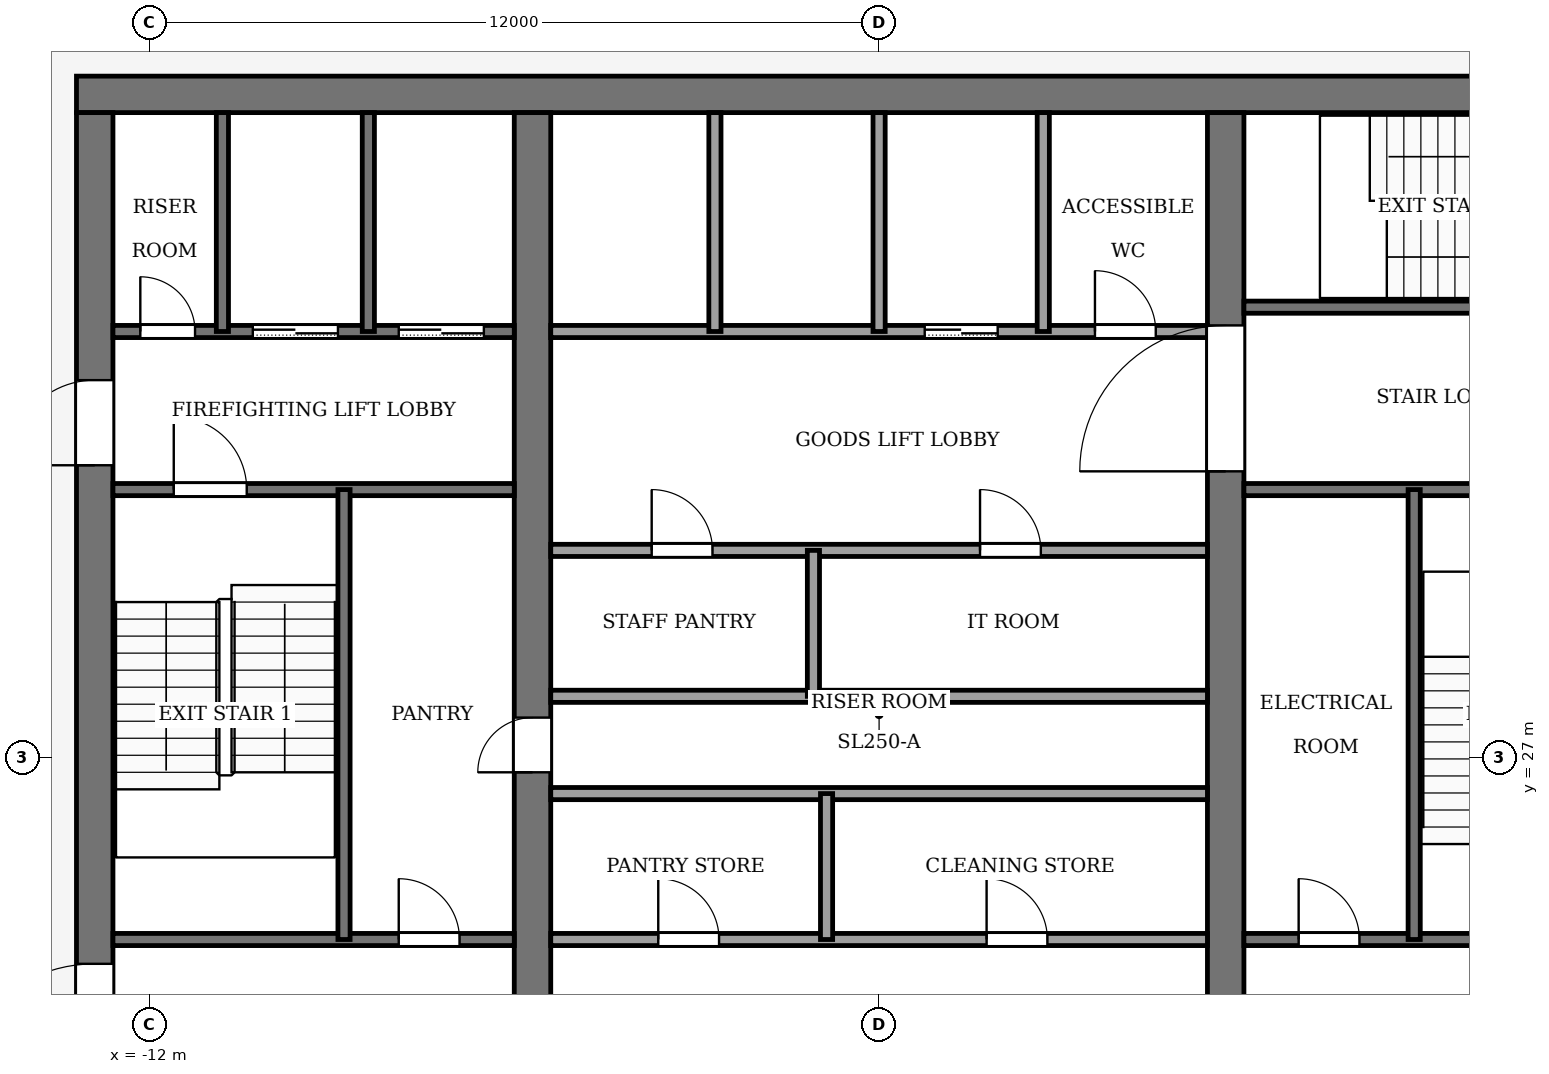
"""IFC4 building model, lengths in metres.
Left out: names, types, materials, properties, quantities, classifications, styles, units other than length and angle.
Written with IfcOpenShell. Run it as: python <this file> out.ifc"""

import sys

from ifc_helpers import new_model, si_unit, direction, frame, frame_2d, origin, place, context, subcontext, project, spatial, rectangle, extrude, element, fill, save


model = new_model("IFC4")
c1 = context("Model", 3, precision=1e-05, world=origin(), true_north=direction((0.0, 1.0)))
c2 = subcontext(c1, "Body", "Model", "MODEL_VIEW")
j1 = project(units=[si_unit("LENGTHUNIT", "METRE"), si_unit("PLANEANGLEUNIT", "RADIAN")], contexts=[c1])
p1 = place(None, origin())
s1 = spatial("IfcSite", under=j1, at=p1, CompositionType="ELEMENT")
p2 = place(p1, origin())
s2 = spatial("IfcBuilding", under=s1, at=p2, CompositionType="ELEMENT")
p3 = place(p2, frame((0.0, 0.0, 310.0)))
s3 = spatial("IfcBuildingStorey", under=s2, at=p3, CompositionType="ELEMENT", Elevation=310.0)
p4 = place(p3, frame((-13.2, 37.9, -0.13), z_axis=(0.0, 0.0, 1.0), x_axis=(1.0, 0.0, 0.0)))
e1 = element("IfcWall", 1, at=p4, inside=s3, PredefinedType="SHEAR", context=c2, shape_type="SweptSolid", body=[
    extrude(rectangle(XDim=26.4, YDim=0.6, at=frame_2d((13.2, 0.0))), origin(), (0.0, 0.0, 1.0), 4.0),
])
p5 = place(p3, frame((-12.9, 18.4, -0.13), z_axis=(0.0, 0.0, 1.0), x_axis=(0.0, 1.0, 0.0)))
e2 = element("IfcWall", 2, at=p5, inside=s3, PredefinedType="SHEAR", context=c2, shape_type="SweptSolid", body=[
    extrude(rectangle(XDim=19.2, YDim=0.6, at=frame_2d((9.6, 0.0))), origin(), (0.0, 0.0, 1.0), 4.0),
])
p6 = place(p5, frame((2.8, 0.0, 0.13)))
e3 = element("IfcOpeningElement", 3, at=p6, cuts=e2, PredefinedType="OPENING", context=c2, shape_type="SweptSolid", body=[
    extrude(rectangle(XDim=2.4, YDim=2.4, at=frame_2d((1.2, 1.2))), frame((0.0, 0.31, 0.0), z_axis=(0.0, -1.0, 0.0), x_axis=(1.0, 0.0, 0.0)), (0.0, 0.0, 1.0), 0.62),
])
p7 = place(p5, frame((13.4, 0.0, 0.13)))
e4 = element("IfcOpeningElement", 4, at=p7, cuts=e2, PredefinedType="OPENING", context=c2, shape_type="SweptSolid", body=[
    extrude(rectangle(XDim=1.4, YDim=2.2, at=frame_2d((0.7, 1.1))), frame((0.0, 0.31, 0.0), z_axis=(0.0, -1.0, 0.0), x_axis=(1.0, 0.0, 0.0)), (0.0, 0.0, 1.0), 0.62),
])
p8 = place(p3, frame((-5.7, 18.4, -0.13), z_axis=(0.0, 0.0, 1.0), x_axis=(0.0, 1.0, 0.0)))
e5 = element("IfcWall", 5, at=p8, inside=s3, PredefinedType="SHEAR", context=c2, shape_type="SweptSolid", body=[
    extrude(rectangle(XDim=19.2, YDim=0.6, at=frame_2d((9.6, 0.0))), origin(), (0.0, 0.0, 1.0), 4.0),
])
p9 = place(p8, frame((8.35, 0.0, 0.13)))
e6 = element("IfcOpeningElement", 6, at=p9, cuts=e5, PredefinedType="OPENING", context=c2, shape_type="SweptSolid", body=[
    extrude(rectangle(XDim=0.9, YDim=2.1, at=frame_2d((0.45, 1.05))), frame((0.0, 0.31, 0.0), z_axis=(0.0, -1.0, 0.0), x_axis=(1.0, 0.0, 0.0)), (0.0, 0.0, 1.0), 0.62),
])
p10 = place(p3, frame((5.7, 18.4, -0.13), z_axis=(0.0, 0.0, 1.0), x_axis=(0.0, 1.0, 0.0)))
e7 = element("IfcWall", 7, at=p10, inside=s3, PredefinedType="SHEAR", context=c2, shape_type="SweptSolid", body=[
    extrude(rectangle(XDim=19.2, YDim=0.6, at=frame_2d((9.6, 0.0))), origin(), (0.0, 0.0, 1.0), 4.0),
])
p11 = place(p10, frame((13.3, 0.0, 0.13)))
e8 = element("IfcOpeningElement", 8, at=p11, cuts=e7, PredefinedType="OPENING", context=c2, shape_type="SweptSolid", body=[
    extrude(rectangle(XDim=2.4, YDim=2.4, at=frame_2d((1.2, 1.2))), frame((0.0, 0.31, 0.0), z_axis=(0.0, -1.0, 0.0), x_axis=(1.0, 0.0, 0.0)), (0.0, 0.0, 1.0), 0.62),
])
p12 = place(p3, frame((-12.6, 24.0, 0.0), z_axis=(0.0, 0.0, 1.0), x_axis=(1.0, 0.0, 0.0)))
e9 = element("IfcWall", 9, at=p12, inside=s3, PredefinedType="PARTITIONING", context=c2, shape_type="SweptSolid", body=[
    extrude(rectangle(XDim=6.6, YDim=0.2, at=frame_2d((3.3, 0.0))), origin(), (0.0, 0.0, 1.0), 3.87),
])
p13 = place(p12, frame((4.7, 0.0, 0.0)))
e10 = element("IfcOpeningElement", 10, at=p13, cuts=e9, PredefinedType="OPENING", context=c2, shape_type="SweptSolid", body=[
    extrude(rectangle(XDim=1.0, YDim=2.1, at=frame_2d((0.5, 1.05))), frame((0.0, 0.11, 0.0), z_axis=(0.0, -1.0, 0.0), x_axis=(1.0, 0.0, 0.0)), (0.0, 0.0, 1.0), 0.22),
])
p14 = place(p3, frame((-5.4, 24.0, 0.0), z_axis=(0.0, 0.0, 1.0), x_axis=(1.0, 0.0, 0.0)))
e11 = element("IfcWall", 11, at=p14, inside=s3, PredefinedType="PARTITIONING", context=c2, shape_type="SweptSolid", body=[
    extrude(rectangle(XDim=10.8, YDim=0.2, at=frame_2d((5.4, 0.0))), origin(), (0.0, 0.0, 1.0), 3.87),
])
p15 = place(p14, frame((1.768, 0.0, 0.0)))
e12 = element("IfcOpeningElement", 12, at=p15, cuts=e11, PredefinedType="OPENING", context=c2, shape_type="SweptSolid", body=[
    extrude(rectangle(XDim=1.0, YDim=2.1, at=frame_2d((0.5, 1.05))), frame((0.0, 0.11, 0.0), z_axis=(0.0, -1.0, 0.0), x_axis=(1.0, 0.0, 0.0)), (0.0, 0.0, 1.0), 0.22),
])
p16 = place(p14, frame((7.168, 0.0, 0.0)))
e13 = element("IfcOpeningElement", 13, at=p16, cuts=e11, PredefinedType="OPENING", context=c2, shape_type="SweptSolid", body=[
    extrude(rectangle(XDim=1.0, YDim=2.1, at=frame_2d((0.5, 1.05))), frame((0.0, 0.11, 0.0), z_axis=(0.0, -1.0, 0.0), x_axis=(1.0, 0.0, 0.0)), (0.0, 0.0, 1.0), 0.22),
])
p17 = place(p3, frame((6.0, 24.0, 0.0), z_axis=(0.0, 0.0, 1.0), x_axis=(1.0, 0.0, 0.0)))
e14 = element("IfcWall", 14, at=p17, inside=s3, PredefinedType="PARTITIONING", context=c2, shape_type="SweptSolid", body=[
    extrude(rectangle(XDim=6.6, YDim=0.2, at=frame_2d((3.3, 0.0))), origin(), (0.0, 0.0, 1.0), 3.87),
])
p18 = place(p17, frame((0.9, 0.0, 0.0)))
e15 = element("IfcOpeningElement", 15, at=p18, cuts=e14, PredefinedType="OPENING", context=c2, shape_type="SweptSolid", body=[
    extrude(rectangle(XDim=1.0, YDim=2.1, at=frame_2d((0.5, 1.05))), frame((0.0, 0.11, 0.0), z_axis=(0.0, -1.0, 0.0), x_axis=(1.0, 0.0, 0.0)), (0.0, 0.0, 1.0), 0.22),
])
p19 = place(p17, frame((4.4, 0.0, 0.0)))
e16 = element("IfcOpeningElement", 16, at=p19, cuts=e14, PredefinedType="OPENING", context=c2, shape_type="SweptSolid", body=[
    extrude(rectangle(XDim=1.2, YDim=2.2, at=frame_2d((0.6, 1.1))), frame((0.0, 0.11, 0.0), z_axis=(0.0, -1.0, 0.0), x_axis=(1.0, 0.0, 0.0)), (0.0, 0.0, 1.0), 0.22),
])
for number, where, z_axis, x_axis in (
    (17, (-5.4, 26.4, 0.0), (0.0, 0.0, 1.0), (1.0, 0.0, 0.0)),
    (18, (-5.4, 28.0, 0.0), (0.0, 0.0, 1.0), (1.0, 0.0, 0.0)),
):
    element("IfcWall", number, at=place(p3, frame(where, z_axis=z_axis, x_axis=x_axis)), inside=s3, PredefinedType="PARTITIONING", context=c2, shape_type="SweptSolid", body=[
        extrude(rectangle(XDim=10.8, YDim=0.2, at=frame_2d((5.4, 0.0))), origin(), (0.0, 0.0, 1.0), 3.87),
    ])
p20 = place(p3, frame((-5.4, 30.4, 0.0), z_axis=(0.0, 0.0, 1.0), x_axis=(1.0, 0.0, 0.0)))
e19 = element("IfcWall", 19, at=p20, inside=s3, PredefinedType="PARTITIONING", context=c2, shape_type="SweptSolid", body=[
    extrude(rectangle(XDim=10.8, YDim=0.2, at=frame_2d((5.4, 0.0))), origin(), (0.0, 0.0, 1.0), 3.87),
])
p21 = place(p20, frame((1.66, 0.0, 0.0)))
e20 = element("IfcOpeningElement", 20, at=p21, cuts=e19, PredefinedType="OPENING", context=c2, shape_type="SweptSolid", body=[
    extrude(rectangle(XDim=1.0, YDim=2.1, at=frame_2d((0.5, 1.05))), frame((0.0, 0.11, 0.0), z_axis=(0.0, -1.0, 0.0), x_axis=(1.0, 0.0, 0.0)), (0.0, 0.0, 1.0), 0.22),
])
p22 = place(p20, frame((7.06, 0.0, 0.0)))
e21 = element("IfcOpeningElement", 21, at=p22, cuts=e19, PredefinedType="OPENING", context=c2, shape_type="SweptSolid", body=[
    extrude(rectangle(XDim=1.0, YDim=2.1, at=frame_2d((0.5, 1.05))), frame((0.0, 0.11, 0.0), z_axis=(0.0, -1.0, 0.0), x_axis=(1.0, 0.0, 0.0)), (0.0, 0.0, 1.0), 0.22),
])
p23 = place(p3, frame((-12.6, 31.4, 0.0), z_axis=(0.0, 0.0, 1.0), x_axis=(1.0, 0.0, 0.0)))
e22 = element("IfcWall", 22, at=p23, inside=s3, PredefinedType="PARTITIONING", context=c2, shape_type="SweptSolid", body=[
    extrude(rectangle(XDim=6.6, YDim=0.2, at=frame_2d((3.3, 0.0))), origin(), (0.0, 0.0, 1.0), 3.87),
])
p24 = place(p23, frame((1.0, 0.0, 0.0)))
e23 = element("IfcOpeningElement", 23, at=p24, cuts=e22, PredefinedType="OPENING", context=c2, shape_type="SweptSolid", body=[
    extrude(rectangle(XDim=1.2, YDim=2.2, at=frame_2d((0.6, 1.1))), frame((0.0, 0.11, 0.0), z_axis=(0.0, -1.0, 0.0), x_axis=(1.0, 0.0, 0.0)), (0.0, 0.0, 1.0), 0.22),
])
p25 = place(p3, frame((6.0, 31.4, 0.0), z_axis=(0.0, 0.0, 1.0), x_axis=(1.0, 0.0, 0.0)))
e24 = element("IfcWall", 24, at=p25, inside=s3, PredefinedType="PARTITIONING", context=c2, shape_type="SweptSolid", body=[
    extrude(rectangle(XDim=6.6, YDim=0.2, at=frame_2d((3.3, 0.0))), origin(), (0.0, 0.0, 1.0), 3.87),
])
p26 = place(p3, frame((-12.6, 34.0, 0.0), z_axis=(0.0, 0.0, 1.0), x_axis=(1.0, 0.0, 0.0)))
e25 = element("IfcWall", 25, at=p26, inside=s3, PredefinedType="PARTITIONING", context=c2, shape_type="SweptSolid", body=[
    extrude(rectangle(XDim=6.6, YDim=0.2, at=frame_2d((3.3, 0.0))), origin(), (0.0, 0.0, 1.0), 3.87),
])
p27 = place(p26, frame((4.7, 0.0, 0.0)))
e26 = element("IfcOpeningElement", 26, at=p27, cuts=e25, PredefinedType="OPENING", context=c2, shape_type="SweptSolid", body=[
    extrude(rectangle(XDim=1.4, YDim=2.2, at=frame_2d((0.7, 1.1))), frame((0.0, 0.11, 0.0), z_axis=(0.0, -1.0, 0.0), x_axis=(1.0, 0.0, 0.0)), (0.0, 0.0, 1.0), 0.22),
])
p28 = place(p26, frame((2.3, 0.0, 0.0)))
e27 = element("IfcOpeningElement", 27, at=p28, cuts=e25, PredefinedType="OPENING", context=c2, shape_type="SweptSolid", body=[
    extrude(rectangle(XDim=1.4, YDim=2.2, at=frame_2d((0.7, 1.1))), frame((0.0, 0.11, 0.0), z_axis=(0.0, -1.0, 0.0), x_axis=(1.0, 0.0, 0.0)), (0.0, 0.0, 1.0), 0.22),
])
p29 = place(p26, frame((0.45, 0.0, 0.0)))
e28 = element("IfcOpeningElement", 28, at=p29, cuts=e25, PredefinedType="OPENING", context=c2, shape_type="SweptSolid", body=[
    extrude(rectangle(XDim=0.9, YDim=2.1, at=frame_2d((0.45, 1.05))), frame((0.0, 0.11, 0.0), z_axis=(0.0, -1.0, 0.0), x_axis=(1.0, 0.0, 0.0)), (0.0, 0.0, 1.0), 0.22),
])
p30 = place(p3, frame((-5.4, 34.0, 0.0), z_axis=(0.0, 0.0, 1.0), x_axis=(1.0, 0.0, 0.0)))
e29 = element("IfcWall", 29, at=p30, inside=s3, PredefinedType="PARTITIONING", context=c2, shape_type="SweptSolid", body=[
    extrude(rectangle(XDim=10.8, YDim=0.2, at=frame_2d((5.4, 0.0))), origin(), (0.0, 0.0, 1.0), 3.87),
])
p31 = place(p30, frame((6.15, 0.0, 0.0)))
e30 = element("IfcOpeningElement", 30, at=p31, cuts=e29, PredefinedType="OPENING", context=c2, shape_type="SweptSolid", body=[
    extrude(rectangle(XDim=1.2, YDim=2.2, at=frame_2d((0.6, 1.1))), frame((0.0, 0.11, 0.0), z_axis=(0.0, -1.0, 0.0), x_axis=(1.0, 0.0, 0.0)), (0.0, 0.0, 1.0), 0.22),
])
p32 = place(p30, frame((8.95, 0.0, 0.0)))
e31 = element("IfcOpeningElement", 31, at=p32, cuts=e29, PredefinedType="OPENING", context=c2, shape_type="SweptSolid", body=[
    extrude(rectangle(XDim=1.0, YDim=2.1, at=frame_2d((0.5, 1.05))), frame((0.0, 0.11, 0.0), z_axis=(0.0, -1.0, 0.0), x_axis=(1.0, 0.0, 0.0)), (0.0, 0.0, 1.0), 0.22),
])
p33 = place(p3, frame((6.0, 34.4, 0.0), z_axis=(0.0, 0.0, 1.0), x_axis=(1.0, 0.0, 0.0)))
e32 = element("IfcWall", 32, at=p33, inside=s3, PredefinedType="PARTITIONING", context=c2, shape_type="SweptSolid", body=[
    extrude(rectangle(XDim=6.6, YDim=0.2, at=frame_2d((3.3, 0.0))), origin(), (0.0, 0.0, 1.0), 3.87),
])
p34 = place(p33, frame((4.8, 0.0, 0.0)))
e33 = element("IfcOpeningElement", 33, at=p34, cuts=e32, PredefinedType="OPENING", context=c2, shape_type="SweptSolid", body=[
    extrude(rectangle(XDim=1.2, YDim=2.2, at=frame_2d((0.6, 1.1))), frame((0.0, 0.11, 0.0), z_axis=(0.0, -1.0, 0.0), x_axis=(1.0, 0.0, 0.0)), (0.0, 0.0, 1.0), 0.22),
])
p35 = place(p3, frame((-10.8, 34.0, 0.0), z_axis=(0.0, 0.0, 1.0), x_axis=(0.0, 1.0, 0.0)))
e34 = element("IfcWall", 34, at=p35, inside=s3, PredefinedType="PARTITIONING", context=c2, shape_type="SweptSolid", body=[
    extrude(rectangle(XDim=3.6, YDim=0.2, at=frame_2d((1.8, 0.0))), origin(), (0.0, 0.0, 1.0), 3.87),
])
p36 = place(p3, frame((-8.8, 24.0, 0.0), z_axis=(0.0, 0.0, 1.0), x_axis=(0.0, 1.0, 0.0)))
e35 = element("IfcWall", 35, at=p36, inside=s3, PredefinedType="PARTITIONING", context=c2, shape_type="SweptSolid", body=[
    extrude(rectangle(XDim=7.4, YDim=0.2, at=frame_2d((3.7, 0.0))), origin(), (0.0, 0.0, 1.0), 3.87),
])
for number, where, z_axis, x_axis in (
    (36, (-8.4, 34.0, 0.0), (0.0, 0.0, 1.0), (0.0, 1.0, 0.0)),
    (37, (-2.7, 34.0, 0.0), (0.0, 0.0, 1.0), (0.0, 1.0, 0.0)),
):
    element("IfcWall", number, at=place(p3, frame(where, z_axis=z_axis, x_axis=x_axis)), inside=s3, PredefinedType="PARTITIONING", context=c2, shape_type="SweptSolid", body=[
        extrude(rectangle(XDim=3.6, YDim=0.2, at=frame_2d((1.8, 0.0))), origin(), (0.0, 0.0, 1.0), 3.87),
    ])
for number, where, z_axis, x_axis in (
    (38, (-1.08, 28.0, 0.0), (0.0, 0.0, 1.0), (0.0, 1.0, 0.0)),
    (39, (-0.864, 24.0, 0.0), (0.0, 0.0, 1.0), (0.0, 1.0, 0.0)),
):
    element("IfcWall", number, at=place(p3, frame(where, z_axis=z_axis, x_axis=x_axis)), inside=s3, PredefinedType="PARTITIONING", context=c2, shape_type="SweptSolid", body=[
        extrude(rectangle(XDim=2.4, YDim=0.2, at=frame_2d((1.2, 0.0))), origin(), (0.0, 0.0, 1.0), 3.87),
    ])
for number, where, z_axis, x_axis in (
    (40, (0.0, 34.0, 0.0), (0.0, 0.0, 1.0), (0.0, 1.0, 0.0)),
    (41, (2.7, 34.0, 0.0), (0.0, 0.0, 1.0), (0.0, 1.0, 0.0)),
):
    element("IfcWall", number, at=place(p3, frame(where, z_axis=z_axis, x_axis=x_axis)), inside=s3, PredefinedType="PARTITIONING", context=c2, shape_type="SweptSolid", body=[
        extrude(rectangle(XDim=3.6, YDim=0.2, at=frame_2d((1.8, 0.0))), origin(), (0.0, 0.0, 1.0), 3.87),
    ])
p37 = place(p3, frame((8.8, 24.0, 0.0), z_axis=(0.0, 0.0, 1.0), x_axis=(0.0, 1.0, 0.0)))
e42 = element("IfcWall", 42, at=p37, inside=s3, PredefinedType="PARTITIONING", context=c2, shape_type="SweptSolid", body=[
    extrude(rectangle(XDim=7.4, YDim=0.2, at=frame_2d((3.7, 0.0))), origin(), (0.0, 0.0, 1.0), 3.87),
])
p38 = place(p31, origin())
e43 = element("IfcDoor", 43, at=p38, inside=s3, OperationType="SLIDING_TO_LEFT", PredefinedType="DOOR", context=c2, shape_type="SweptSolid", body=[
    extrude(rectangle(XDim=1.2, YDim=2.2, at=frame_2d((0.6, 1.1))), frame((0.0, 0.025, 0.0), z_axis=(0.0, -1.0, 0.0), x_axis=(1.0, 0.0, 0.0)), (0.0, 0.0, 1.0), 0.05),
])
fill(e30, e43)
p39 = place(p27, origin())
e44 = element("IfcDoor", 44, at=p39, inside=s3, OperationType="SLIDING_TO_LEFT", PredefinedType="DOOR", context=c2, shape_type="SweptSolid", body=[
    extrude(rectangle(XDim=1.4, YDim=2.2, at=frame_2d((0.7, 1.1))), frame((0.0, 0.025, 0.0), z_axis=(0.0, -1.0, 0.0), x_axis=(1.0, 0.0, 0.0)), (0.0, 0.0, 1.0), 0.05),
])
fill(e26, e44)
p40 = place(p28, origin())
e45 = element("IfcDoor", 45, at=p40, inside=s3, OperationType="SLIDING_TO_LEFT", PredefinedType="DOOR", context=c2, shape_type="SweptSolid", body=[
    extrude(rectangle(XDim=1.4, YDim=2.2, at=frame_2d((0.7, 1.1))), frame((0.0, 0.025, 0.0), z_axis=(0.0, -1.0, 0.0), x_axis=(1.0, 0.0, 0.0)), (0.0, 0.0, 1.0), 0.05),
])
fill(e27, e45)
p41 = place(p29, origin())
e46 = element("IfcDoor", 46, at=p41, inside=s3, OperationType="SINGLE_SWING_RIGHT", PredefinedType="DOOR", context=c2, shape_type="SweptSolid", body=[
    extrude(rectangle(XDim=0.9, YDim=2.1, at=frame_2d((0.45, 1.05))), frame((0.0, 0.025, 0.0), z_axis=(0.0, -1.0, 0.0), x_axis=(1.0, 0.0, 0.0)), (0.0, 0.0, 1.0), 0.05),
])
fill(e28, e46)
p42 = place(p15, origin())
e47 = element("IfcDoor", 47, at=p42, inside=s3, OperationType="SINGLE_SWING_LEFT", PredefinedType="DOOR", context=c2, shape_type="SweptSolid", body=[
    extrude(rectangle(XDim=1.0, YDim=2.1, at=frame_2d((0.5, 1.05))), frame((0.0, 0.025, 0.0), z_axis=(0.0, -1.0, 0.0), x_axis=(1.0, 0.0, 0.0)), (0.0, 0.0, 1.0), 0.05),
])
fill(e12, e47)
p43 = place(p16, origin())
e48 = element("IfcDoor", 48, at=p43, inside=s3, OperationType="SINGLE_SWING_RIGHT", PredefinedType="DOOR", context=c2, shape_type="SweptSolid", body=[
    extrude(rectangle(XDim=1.0, YDim=2.1, at=frame_2d((0.5, 1.05))), frame((0.0, 0.025, 0.0), z_axis=(0.0, -1.0, 0.0), x_axis=(1.0, 0.0, 0.0)), (0.0, 0.0, 1.0), 0.05),
])
fill(e13, e48)
p44 = place(p21, origin())
e49 = element("IfcDoor", 49, at=p44, inside=s3, OperationType="SINGLE_SWING_RIGHT", PredefinedType="DOOR", context=c2, shape_type="SweptSolid", body=[
    extrude(rectangle(XDim=1.0, YDim=2.1, at=frame_2d((0.5, 1.05))), frame((0.0, 0.025, 0.0), z_axis=(0.0, -1.0, 0.0), x_axis=(1.0, 0.0, 0.0)), (0.0, 0.0, 1.0), 0.05),
])
fill(e20, e49)
p45 = place(p22, origin())
e50 = element("IfcDoor", 50, at=p45, inside=s3, OperationType="SINGLE_SWING_LEFT", PredefinedType="DOOR", context=c2, shape_type="SweptSolid", body=[
    extrude(rectangle(XDim=1.0, YDim=2.1, at=frame_2d((0.5, 1.05))), frame((0.0, 0.025, 0.0), z_axis=(0.0, -1.0, 0.0), x_axis=(1.0, 0.0, 0.0)), (0.0, 0.0, 1.0), 0.05),
])
fill(e21, e50)
p46 = place(p13, origin())
e51 = element("IfcDoor", 51, at=p46, inside=s3, OperationType="SINGLE_SWING_RIGHT", PredefinedType="DOOR", context=c2, shape_type="SweptSolid", body=[
    extrude(rectangle(XDim=1.0, YDim=2.1, at=frame_2d((0.5, 1.05))), frame((0.0, 0.025, 0.0), z_axis=(0.0, -1.0, 0.0), x_axis=(1.0, 0.0, 0.0)), (0.0, 0.0, 1.0), 0.05),
])
fill(e10, e51)
p47 = place(p18, origin())
e52 = element("IfcDoor", 52, at=p47, inside=s3, OperationType="SINGLE_SWING_LEFT", PredefinedType="DOOR", context=c2, shape_type="SweptSolid", body=[
    extrude(rectangle(XDim=1.0, YDim=2.1, at=frame_2d((0.5, 1.05))), frame((0.0, 0.025, 0.0), z_axis=(0.0, -1.0, 0.0), x_axis=(1.0, 0.0, 0.0)), (0.0, 0.0, 1.0), 0.05),
])
fill(e15, e52)
p48 = place(p32, origin())
e53 = element("IfcDoor", 53, at=p48, inside=s3, OperationType="SINGLE_SWING_LEFT", PredefinedType="DOOR", context=c2, shape_type="SweptSolid", body=[
    extrude(rectangle(XDim=1.0, YDim=2.1, at=frame_2d((0.5, 1.05))), frame((0.0, 0.025, 0.0), z_axis=(0.0, -1.0, 0.0), x_axis=(1.0, 0.0, 0.0)), (0.0, 0.0, 1.0), 0.05),
])
fill(e31, e53)
p49 = place(p9, origin())
e54 = element("IfcDoor", 54, at=p49, inside=s3, OperationType="SINGLE_SWING_RIGHT", PredefinedType="DOOR", context=c2, shape_type="SweptSolid", body=[
    extrude(rectangle(XDim=0.9, YDim=2.1, at=frame_2d((0.45, 1.05))), frame((0.0, 0.025, 0.0), z_axis=(0.0, -1.0, 0.0), x_axis=(1.0, 0.0, 0.0)), (0.0, 0.0, 1.0), 0.05),
])
fill(e6, e54)
p50 = place(p24, origin())
e55 = element("IfcDoor", 55, at=p50, inside=s3, OperationType="SINGLE_SWING_RIGHT", PredefinedType="DOOR", context=c2, shape_type="SweptSolid", body=[
    extrude(rectangle(XDim=1.2, YDim=2.2, at=frame_2d((0.6, 1.1))), frame((0.0, 0.025, 0.0), z_axis=(0.0, -1.0, 0.0), x_axis=(1.0, 0.0, 0.0)), (0.0, 0.0, 1.0), 0.05),
])
fill(e23, e55)
p51 = place(p11, origin())
e56 = element("IfcDoor", 56, at=p51, inside=s3, OperationType="DOUBLE_DOOR_SINGLE_SWING", PredefinedType="DOOR", context=c2, shape_type="SweptSolid", body=[
    extrude(rectangle(XDim=2.4, YDim=2.4, at=frame_2d((1.2, 1.2))), frame((0.0, 0.025, 0.0), z_axis=(0.0, -1.0, 0.0), x_axis=(1.0, 0.0, 0.0)), (0.0, 0.0, 1.0), 0.05),
])
fill(e8, e56)
p52 = place(p6, origin())
e57 = element("IfcDoor", 57, at=p52, inside=s3, OperationType="DOUBLE_DOOR_SINGLE_SWING", PredefinedType="DOOR", context=c2, shape_type="SweptSolid", body=[
    extrude(rectangle(XDim=2.4, YDim=2.4, at=frame_2d((1.2, 1.2))), frame((0.0, 0.025, 0.0), z_axis=(0.0, -1.0, 0.0), x_axis=(1.0, 0.0, 0.0)), (0.0, 0.0, 1.0), 0.05),
])
fill(e3, e57)
p53 = place(p7, origin())
e58 = element("IfcDoor", 58, at=p53, inside=s3, OperationType="SINGLE_SWING_RIGHT", PredefinedType="DOOR", context=c2, shape_type="SweptSolid", body=[
    extrude(rectangle(XDim=1.4, YDim=2.2, at=frame_2d((0.7, 1.1))), frame((0.0, 0.025, 0.0), z_axis=(0.0, -1.0, 0.0), x_axis=(1.0, 0.0, 0.0)), (0.0, 0.0, 1.0), 0.05),
])
fill(e4, e58)
save(model, sys.argv[1])
